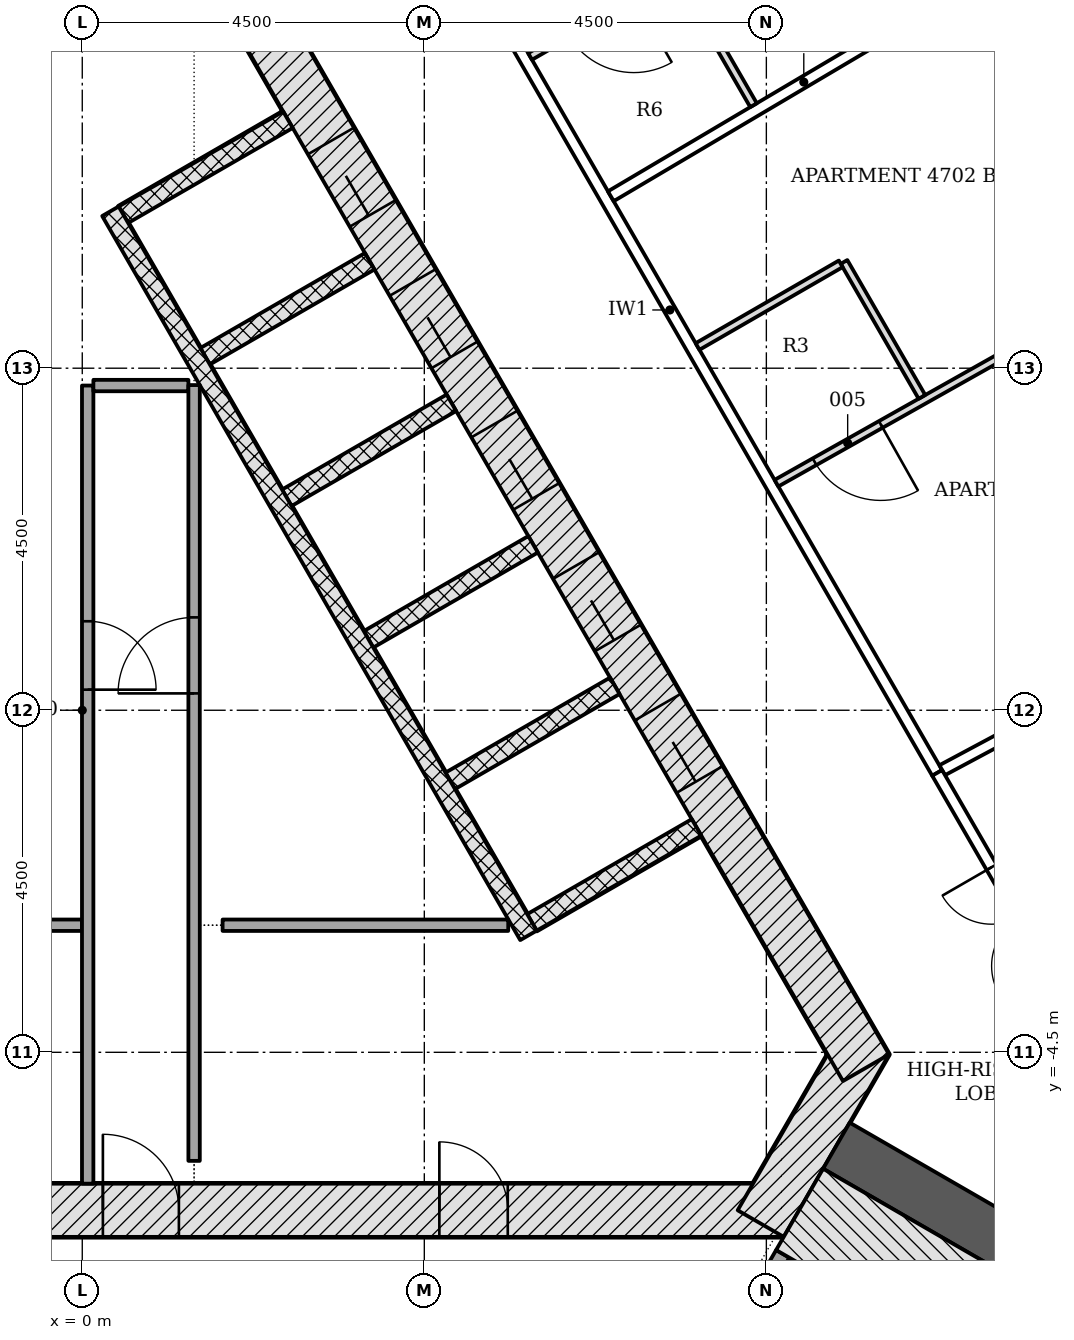
"""IFC4 building model, lengths in metres.
Left out: names, types, materials, properties, quantities, classifications, styles, units other than length and angle.
Written with IfcOpenShell. Run it as: python <this file> out.ifc"""

import sys

from ifc_helpers import new_model, si_unit, direction, frame, frame_2d, origin, place, context, subcontext, project, spatial, polyline, rectangle, outline, extrude, element, fill, save


model = new_model("IFC4")
c1 = context("Model", 3, precision=1e-05, world=origin(), true_north=direction((0.0, 1.0)))
c2 = subcontext(c1, "Body", "Model", "MODEL_VIEW")
j1 = project(units=[si_unit("LENGTHUNIT", "METRE"), si_unit("PLANEANGLEUNIT", "RADIAN")], contexts=[c1])
p1 = place(None, origin())
s1 = spatial("IfcSite", under=j1, at=p1, CompositionType="ELEMENT")
p2 = place(p1, origin())
s2 = spatial("IfcBuilding", under=s1, at=p2, CompositionType="ELEMENT")
p3 = place(p2, frame((0.0, 0.0, 185.1)))
s3 = spatial("IfcBuildingStorey", under=s2, at=p3, CompositionType="ELEMENT", Elevation=185.1)
p4 = place(p3, frame((-9.229, -6.578, -0.2), z_axis=(0.0, 0.0, 1.0), x_axis=(1.0, 0.0, 0.0)))
e1 = element("IfcWall", 1, at=p4, inside=s3, PredefinedType="SHEAR", context=c2, shape_type="SweptSolid", body=[
    extrude(rectangle(XDim=18.458, YDim=0.7, at=frame_2d((9.229, 0.0))), origin(), (0.0, 0.0, 1.0), 3.6),
])
p5 = place(p4, frame((9.5, 0.0, 0.2)))
e2 = element("IfcOpeningElement", 2, at=p5, cuts=e1, PredefinedType="OPENING", context=c2, shape_type="SweptSolid", body=[
    extrude(rectangle(XDim=1.0, YDim=2.1, at=frame_2d((0.5, 1.05))), frame((0.0, 0.36, 0.0), z_axis=(0.0, -1.0, 0.0), x_axis=(1.0, 0.0, 0.0)), (0.0, 0.0, 1.0), 0.72),
])
p6 = place(p4, frame((4.402, 0.0, 0.2)))
e3 = element("IfcOpeningElement", 3, at=p6, cuts=e1, PredefinedType="OPENING", context=c2, shape_type="SweptSolid", body=[
    extrude(rectangle(XDim=0.9, YDim=2.1, at=frame_2d((0.45, 1.05))), frame((0.0, 0.36, 0.0), z_axis=(0.0, -1.0, 0.0), x_axis=(1.0, 0.0, 0.0)), (0.0, 0.0, 1.0), 0.72),
])
p7 = place(p4, frame((13.927, 0.0, 0.2)))
e4 = element("IfcOpeningElement", 4, at=p7, cuts=e1, PredefinedType="OPENING", context=c2, shape_type="SweptSolid", body=[
    extrude(rectangle(XDim=0.9, YDim=2.1, at=frame_2d((0.45, 1.05))), frame((0.0, 0.36, 0.0), z_axis=(0.0, -1.0, 0.0), x_axis=(1.0, 0.0, 0.0)), (0.0, 0.0, 1.0), 0.72),
])
p8 = place(p3, frame((8.926, -6.753, -0.2), z_axis=(0.0, 0.0, 1.0), x_axis=(0.500042739161, 0.866000726912, 0.0)))
e5 = element("IfcWall", 5, at=p8, inside=s3, PredefinedType="SHEAR", context=c2, shape_type="SweptSolid", body=[
    extrude(rectangle(XDim=2.771, YDim=0.7, at=frame_2d((1.386, 0.0))), origin(), (0.0, 0.0, 1.0), 3.6),
])
p9 = place(p3, frame((10.311, -4.703, -0.2), z_axis=(0.0, 0.0, 1.0), x_axis=(-0.500001446645, 0.866024568562, 0.0)))
e6 = element("IfcWall", 6, at=p9, inside=s3, PredefinedType="SHEAR", context=c2, shape_type="SweptSolid", body=[
    extrude(rectangle(XDim=18.458, YDim=0.7, at=frame_2d((9.229, 0.0))), origin(), (0.0, 0.0, 1.0), 3.6),
])
p10 = place(p9, frame((4.379, 0.0, 0.2)))
e7 = element("IfcOpeningElement", 7, at=p10, cuts=e6, PredefinedType="OPENING", context=c2, shape_type="SweptSolid", body=[
    extrude(rectangle(XDim=1.1, YDim=2.1, at=frame_2d((0.55, 1.05))), frame((0.0, 0.36, 0.0), z_axis=(0.0, -1.0, 0.0), x_axis=(1.0, 0.0, 0.0)), (0.0, 0.0, 1.0), 0.72),
])
p11 = place(p9, frame((6.529, 0.0, 0.2)))
e8 = element("IfcOpeningElement", 8, at=p11, cuts=e6, PredefinedType="OPENING", context=c2, shape_type="SweptSolid", body=[
    extrude(rectangle(XDim=1.1, YDim=2.1, at=frame_2d((0.55, 1.05))), frame((0.0, 0.36, 0.0), z_axis=(0.0, -1.0, 0.0), x_axis=(1.0, 0.0, 0.0)), (0.0, 0.0, 1.0), 0.72),
])
p12 = place(p9, frame((8.679, 0.0, 0.2)))
e9 = element("IfcOpeningElement", 9, at=p12, cuts=e6, PredefinedType="OPENING", context=c2, shape_type="SweptSolid", body=[
    extrude(rectangle(XDim=1.1, YDim=2.1, at=frame_2d((0.55, 1.05))), frame((0.0, 0.36, 0.0), z_axis=(0.0, -1.0, 0.0), x_axis=(1.0, 0.0, 0.0)), (0.0, 0.0, 1.0), 0.72),
])
p13 = place(p9, frame((10.829, 0.0, 0.2)))
e10 = element("IfcOpeningElement", 10, at=p13, cuts=e6, PredefinedType="OPENING", context=c2, shape_type="SweptSolid", body=[
    extrude(rectangle(XDim=1.1, YDim=2.1, at=frame_2d((0.55, 1.05))), frame((0.0, 0.36, 0.0), z_axis=(0.0, -1.0, 0.0), x_axis=(1.0, 0.0, 0.0)), (0.0, 0.0, 1.0), 0.72),
])
p14 = place(p9, frame((12.979, 0.0, 0.2)))
e11 = element("IfcOpeningElement", 11, at=p14, cuts=e6, PredefinedType="OPENING", context=c2, shape_type="SweptSolid", body=[
    extrude(rectangle(XDim=1.1, YDim=2.1, at=frame_2d((0.55, 1.05))), frame((0.0, 0.36, 0.0), z_axis=(0.0, -1.0, 0.0), x_axis=(1.0, 0.0, 0.0)), (0.0, 0.0, 1.0), 0.72),
])
p15 = place(p3, frame((9.922, -5.728, -0.2), z_axis=(0.0, 0.0, 1.0), x_axis=(0.866025463095, -0.499999897272, 0.0)))
e12 = element("IfcWall", 12, at=p15, inside=s3, PredefinedType="SHEAR", context=c2, shape_type="SweptSolid", body=[
    extrude(rectangle(XDim=9.521, YDim=0.7, at=frame_2d((4.761, 0.0))), origin(), (0.0, 0.0, 1.0), 3.6),
])
p16 = place(p3, origin())
e13 = element("IfcWall", 13, at=p16, inside=s3, PredefinedType="PARAPET", context=c2, shape_type="SweptSolid", body=[
    extrude(outline(polyline([(22.265, -7.662), (24.846, -6.048), (27.171, -4.156), (29.169, -2.042), (30.78, 0.228), (31.954, 2.586), (32.656, 4.96), (32.864, 7.277), (32.572, 9.469), (31.789, 11.467), (30.539, 13.211), (28.86, 14.648), (26.802, 15.735), (24.429, 16.438), (21.812, 16.737), (19.031, 16.622), (16.171, 16.096), (13.317, 15.176), (10.558, 13.889), (10.664, 13.662), (13.409, 14.942), (16.232, 15.853), (19.059, 16.373), (21.803, 16.487), (24.379, 16.193), (26.708, 15.502), (28.719, 14.44), (30.354, 13.041), (31.568, 11.346), (32.328, 9.406), (32.612, 7.272), (32.409, 5.007), (31.72, 2.678), (30.565, 0.357), (28.976, -1.883), (27.001, -3.972), (24.7, -5.844), (22.132, -7.45), (22.265, -7.662)])), origin(), (0.0, 0.0, 1.0), 1.1),
])
for number, where, z_axis, x_axis in (
    (14, (8.081, -1.541, -0.2), (0.0, 0.0, 1.0), (-0.866, -0.5, 0.0)),
    (15, (7.006, 0.321, -0.2), (0.0, 0.0, 1.0), (-0.866, -0.5, 0.0)),
):
    element("IfcWall", number, at=place(p3, frame(where, z_axis=z_axis, x_axis=x_axis)), inside=s3, PredefinedType="PARTITIONING", context=c2, shape_type="SweptSolid", body=[
        extrude(rectangle(XDim=2.5, YDim=0.25, at=frame_2d((1.25, 0.0))), origin(), (0.0, 0.0, 1.0), 3.6),
    ])
p17 = place(p3, frame((5.931, 2.183, -0.2), z_axis=(0.0, 0.0, 1.0), x_axis=(-0.866047370643, -0.499961950354, 0.0)))
e16 = element("IfcWall", 16, at=p17, inside=s3, PredefinedType="PARTITIONING", context=c2, shape_type="SweptSolid", body=[
    extrude(rectangle(XDim=2.5, YDim=0.25, at=frame_2d((1.25, 0.0))), origin(), (0.0, 0.0, 1.0), 3.6),
])
for number, where, z_axis, x_axis in (
    (17, (4.856, 4.045, -0.2), (0.0, 0.0, 1.0), (-0.866, -0.5, 0.0)),
    (18, (3.781, 5.907, -0.2), (0.0, 0.0, 1.0), (-0.866, -0.5, 0.0)),
    (19, (2.706, 7.769, -0.2), (0.0, 0.0, 1.0), (-0.866, -0.5, 0.0)),
):
    element("IfcWall", number, at=place(p3, frame(where, z_axis=z_axis, x_axis=x_axis)), inside=s3, PredefinedType="PARTITIONING", context=c2, shape_type="SweptSolid", body=[
        extrude(rectangle(XDim=2.5, YDim=0.25, at=frame_2d((1.25, 0.0))), origin(), (0.0, 0.0, 1.0), 3.6),
    ])
p18 = place(p3, frame((5.87, -2.961, 0.0), z_axis=(0.0, 0.0, 1.0), x_axis=(-0.50000615651, 0.866021849293, 0.0)))
e20 = element("IfcWall", 20, at=p18, inside=s3, PredefinedType="PARTITIONING", context=c2, shape_type="SweptSolid", body=[
    extrude(rectangle(XDim=11.0, YDim=0.25, at=frame_2d((5.5, 0.0))), origin(), (0.0, 0.0, 1.0), 3.4),
])
p19 = place(p3, frame((-5.142, -2.828, 0.0), z_axis=(0.0, 0.0, 1.0), x_axis=(1.0, 0.0, 0.0)))
e21 = element("IfcWall", 21, at=p19, inside=s3, PredefinedType="PARTITIONING", context=c2, shape_type="SweptSolid", body=[
    extrude(rectangle(XDim=5.139, YDim=0.15, at=frame_2d((2.569, 0.0))), origin(), (0.0, 0.0, 1.0), 3.4),
])
p20 = place(p3, frame((0.071, 4.272, 0.0), z_axis=(0.0, 0.0, 1.0), x_axis=(0.0, -1.0, 0.0)))
e22 = element("IfcWall", 22, at=p20, inside=s3, PredefinedType="PARTITIONING", context=c2, shape_type="SweptSolid", body=[
    extrude(rectangle(XDim=10.5, YDim=0.15, at=frame_2d((5.25, 0.0))), origin(), (0.0, 0.0, 1.0), 3.4),
])
p21 = place(p20, frame((3.101, 0.0, 0.0)))
e23 = element("IfcOpeningElement", 23, at=p21, cuts=e22, PredefinedType="OPENING", context=c2, shape_type="SweptSolid", body=[
    extrude(rectangle(XDim=0.9, YDim=2.1, at=frame_2d((0.45, 1.05))), frame((0.0, 0.085, 0.0), z_axis=(0.0, -1.0, 0.0), x_axis=(1.0, 0.0, 0.0)), (0.0, 0.0, 1.0), 0.17),
])
p22 = place(p3, frame((0.146, 4.272, 0.0), z_axis=(0.0, 0.0, 1.0), x_axis=(1.0, 0.0, 0.0)))
e24 = element("IfcWall", 24, at=p22, inside=s3, PredefinedType="PARTITIONING", context=c2, shape_type="SweptSolid", body=[
    extrude(rectangle(XDim=1.25, YDim=0.15, at=frame_2d((0.625, 0.0))), origin(), (0.0, 0.0, 1.0), 3.4),
])
p23 = place(p3, frame((1.471, -5.928, 0.0), z_axis=(0.0, 0.0, 1.0), x_axis=(0.0, 1.0, 0.0)))
e25 = element("IfcWall", 25, at=p23, inside=s3, PredefinedType="PARTITIONING", context=c2, shape_type="SweptSolid", body=[
    extrude(rectangle(XDim=10.206, YDim=0.15, at=frame_2d((5.103, 0.0))), origin(), (0.0, 0.0, 1.0), 3.4),
])
p24 = place(p23, frame((6.15, 0.0, 0.0)))
e26 = element("IfcOpeningElement", 26, at=p24, cuts=e25, PredefinedType="OPENING", context=c2, shape_type="SweptSolid", body=[
    extrude(rectangle(XDim=1.0, YDim=2.1, at=frame_2d((0.5, 1.05))), frame((0.0, 0.085, 0.0), z_axis=(0.0, -1.0, 0.0), x_axis=(1.0, 0.0, 0.0)), (0.0, 0.0, 1.0), 0.17),
])
p25 = place(p3, frame((1.846, -2.828, 0.0), z_axis=(0.0, 0.0, 1.0), x_axis=(1.0, 0.0, 0.0)))
e27 = element("IfcWall", 27, at=p25, inside=s3, PredefinedType="PARTITIONING", context=c2, shape_type="SweptSolid", body=[
    extrude(rectangle(XDim=3.758, YDim=0.15, at=frame_2d((1.879, 0.0))), origin(), (0.0, 0.0, 1.0), 3.4),
])
p26 = place(p3, frame((7.44, -10.226, -0.2), z_axis=(0.0, 0.0, 1.0), x_axis=(0.500022077904, 0.866012656725, 0.0)))
e28 = element("IfcWall", 28, at=p26, inside=s3, PredefinedType="SHEAR", context=c2, shape_type="SweptSolid", body=[
    extrude(rectangle(XDim=3.55, YDim=0.2, at=frame_2d((1.775, 0.0))), origin(), (0.0, 0.0, 1.0), 3.6),
])
p27 = place(p26, frame((1.175, 0.0, 0.2)))
e29 = element("IfcOpeningElement", 29, at=p27, cuts=e28, PredefinedType="OPENING", context=c2, shape_type="SweptSolid", body=[
    extrude(rectangle(XDim=1.2, YDim=2.1, at=frame_2d((0.6, 1.05))), frame((0.0, 0.11, 0.0), z_axis=(0.0, -1.0, 0.0), x_axis=(1.0, 0.0, 0.0)), (0.0, 0.0, 1.0), 0.22),
])
p28 = place(p3, frame((9.438, -6.566, -0.2), z_axis=(0.0, 0.0, 1.0), x_axis=(0.866026919366, -0.499997374926, 0.0)))
e30 = element("IfcWall", 30, at=p28, inside=s3, PredefinedType="SHEAR", context=c2, shape_type="SweptSolid", body=[
    extrude(rectangle(XDim=7.2, YDim=1.236, at=frame_2d((3.6, 0.0))), origin(), (0.0, 0.0, 1.0), 3.6),
])
p29 = place(p3, frame((11.247, -0.824, 0.0), z_axis=(0.0, 0.0, 1.0), x_axis=(-0.499997921847, 0.866026603603, 0.0)))
e31 = element("IfcWall", 31, at=p29, inside=s3, PredefinedType="PARTITIONING", context=c2, shape_type="SweptSolid", body=[
    extrude(rectangle(XDim=14.065, YDim=0.15, at=frame_2d((7.032, 0.0))), origin(), (0.0, 0.0, 1.0), 2.847),
])
p30 = place(p29, frame((11.953, 0.0, 0.0)))
e32 = element("IfcOpeningElement", 32, at=p30, cuts=e31, PredefinedType="OPENING", context=c2, shape_type="SweptSolid", body=[
    extrude(rectangle(XDim=1.0, YDim=2.1, at=frame_2d((0.5, 1.05))), frame((0.0, 0.085, 0.0), z_axis=(0.0, -1.0, 0.0), x_axis=(1.0, 0.0, 0.0)), (0.0, 0.0, 1.0), 0.17),
])
p31 = place(p3, frame((16.44, 1.956, 0.0), z_axis=(0.0, 0.0, 1.0), x_axis=(-0.881627849584, -0.471945266783, 0.0)))
e33 = element("IfcWall", 33, at=p31, inside=s3, PredefinedType="PARTITIONING", context=c2, shape_type="SweptSolid", body=[
    extrude(rectangle(XDim=5.815, YDim=0.15, at=frame_2d((2.907, 0.0))), origin(), (0.0, 0.0, 1.0), 3.4),
])
p32 = place(p31, frame((2.445, 0.0, 0.0)))
e34 = element("IfcOpeningElement", 34, at=p32, cuts=e33, PredefinedType="OPENING", context=c2, shape_type="SweptSolid", body=[
    extrude(rectangle(XDim=1.0, YDim=2.1, at=frame_2d((0.5, 1.05))), frame((0.0, 0.085, 0.0), z_axis=(0.0, -1.0, 0.0), x_axis=(1.0, 0.0, 0.0)), (0.0, 0.0, 1.0), 0.17),
])
p33 = place(p3, frame((13.429, -4.604, 0.0), z_axis=(0.0, 0.0, 1.0), x_axis=(-0.499995208485, 0.866028170149, 0.0)))
e35 = element("IfcWall", 35, at=p33, inside=s3, PredefinedType="PARTITIONING", context=c2, shape_type="SweptSolid", body=[
    extrude(rectangle(XDim=4.365, YDim=0.15, at=frame_2d((2.182, 0.0))), origin(), (0.0, 0.0, 1.0), 2.852),
])
p34 = place(p33, frame((1.432, 0.0, 0.0)))
e36 = element("IfcOpeningElement", 36, at=p34, cuts=e35, PredefinedType="OPENING", context=c2, shape_type="SweptSolid", body=[
    extrude(rectangle(XDim=1.5, YDim=2.1, at=frame_2d((0.75, 1.05))), frame((0.0, 0.085, 0.0), z_axis=(0.0, -1.0, 0.0), x_axis=(1.0, 0.0, 0.0)), (0.0, 0.0, 1.0), 0.17),
])
p35 = place(p3, frame((14.277, 5.885, 0.0), z_axis=(0.0, 0.0, 1.0), x_axis=(-0.871335785584, -0.490687220907, 0.0)))
e37 = element("IfcWall", 37, at=p35, inside=s3, PredefinedType="PARTITIONING", context=c2, shape_type="SweptSolid", body=[
    extrude(rectangle(XDim=5.904, YDim=0.1, at=frame_2d((2.952, 0.0))), origin(), (0.0, 0.0, 1.0), 3.4),
])
p36 = place(p35, frame((1.339, 0.0, 0.0)))
e38 = element("IfcOpeningElement", 38, at=p36, cuts=e37, PredefinedType="OPENING", context=c2, shape_type="SweptSolid", body=[
    extrude(rectangle(XDim=1.0, YDim=2.1, at=frame_2d((0.5, 1.05))), frame((0.0, 0.06, 0.0), z_axis=(0.0, -1.0, 0.0), x_axis=(1.0, 0.0, 0.0)), (0.0, 0.0, 1.0), 0.12),
])
p37 = place(p35, frame((4.329, 0.0, 0.0)))
e39 = element("IfcOpeningElement", 39, at=p37, cuts=e37, PredefinedType="OPENING", context=c2, shape_type="SweptSolid", body=[
    extrude(rectangle(XDim=1.0, YDim=2.1, at=frame_2d((0.5, 1.05))), frame((0.0, 0.06, 0.0), z_axis=(0.0, -1.0, 0.0), x_axis=(1.0, 0.0, 0.0)), (0.0, 0.0, 1.0), 0.12),
])
p38 = place(p3, frame((11.047, 4.123, 0.0), z_axis=(0.0, 0.0, 1.0), x_axis=(-0.500007699544, 0.866020958405, 0.0)))
e40 = element("IfcWall", 40, at=p38, inside=s3, PredefinedType="PARTITIONING", context=c2, shape_type="SweptSolid", body=[
    extrude(rectangle(XDim=2.05, YDim=0.1, at=frame_2d((1.025, 0.0))), origin(), (0.0, 0.0, 1.0), 3.4),
])
p39 = place(p3, frame((9.979, 5.873, 0.0), z_axis=(0.0, 0.0, 1.0), x_axis=(-0.866037911478, -0.499978335414, 0.0)))
e41 = element("IfcWall", 41, at=p39, inside=s3, PredefinedType="PARTITIONING", context=c2, shape_type="SweptSolid", body=[
    extrude(rectangle(XDim=2.175, YDim=0.1, at=frame_2d((1.087, 0.0))), origin(), (0.0, 0.0, 1.0), 3.4),
])
p40 = place(p3, frame((12.031, 9.766, 0.0), z_axis=(0.0, 0.0, 1.0), x_axis=(-0.860638865546, -0.509215811922, 0.0)))
e42 = element("IfcWall", 42, at=p40, inside=s3, PredefinedType="PARTITIONING", context=c2, shape_type="SweptSolid", body=[
    extrude(rectangle(XDim=5.9, YDim=0.15, at=frame_2d((2.95, 0.0))), origin(), (0.0, 0.0, 1.0), 3.4),
])
p41 = place(p3, frame((8.831, 7.96, 0.0), z_axis=(0.0, 0.0, 1.0), x_axis=(-0.499990325971, 0.866030989016, 0.0)))
e43 = element("IfcWall", 43, at=p41, inside=s3, PredefinedType="PARTITIONING", context=c2, shape_type="SweptSolid", body=[
    extrude(rectangle(XDim=2.025, YDim=0.1, at=frame_2d((1.012, 0.0))), origin(), (0.0, 0.0, 1.0), 3.4),
])
p42 = place(p3, frame((7.775, 9.689, 0.0), z_axis=(0.0, 0.0, 1.0), x_axis=(-0.865989304205, -0.500062521093, 0.0)))
e44 = element("IfcWall", 44, at=p42, inside=s3, PredefinedType="PARTITIONING", context=c2, shape_type="SweptSolid", body=[
    extrude(rectangle(XDim=2.175, YDim=0.1, at=frame_2d((1.087, 0.0))), origin(), (0.0, 0.0, 1.0), 3.4),
])
p43 = place(p42, frame((0.6, 0.0, 0.0)))
e45 = element("IfcOpeningElement", 45, at=p43, cuts=e44, PredefinedType="OPENING", context=c2, shape_type="SweptSolid", body=[
    extrude(rectangle(XDim=1.0, YDim=2.1, at=frame_2d((0.5, 1.05))), frame((0.0, 0.06, 0.0), z_axis=(0.0, -1.0, 0.0), x_axis=(1.0, 0.0, 0.0)), (0.0, 0.0, 1.0), 0.12),
])
p44 = place(p3, frame((-0.35, 18.85, 0.0), z_axis=(0.0, 0.0, 1.0), x_axis=(-0.500005388685, -0.866022292603, 0.0)))
e46 = element("IfcWall", 46, at=p44, inside=s3, PredefinedType="PARTITIONING", context=c2, shape_type="SweptSolid", body=[
    extrude(rectangle(XDim=14.167, YDim=0.15, at=frame_2d((7.083, 0.0))), origin(), (0.0, 0.0, 1.0), 2.847),
])
p45 = place(p10, origin())
e47 = element("IfcDoor", 47, at=p45, inside=s3, OperationType="DOUBLE_DOOR_SLIDING", PredefinedType="DOOR", context=c2, shape_type="SweptSolid", body=[
    extrude(rectangle(XDim=1.1, YDim=2.1, at=frame_2d((0.55, 1.05))), frame((0.0, 0.025, 0.0), z_axis=(0.0, -1.0, 0.0), x_axis=(1.0, 0.0, 0.0)), (0.0, 0.0, 1.0), 0.05),
])
fill(e7, e47)
p46 = place(p11, origin())
e48 = element("IfcDoor", 48, at=p46, inside=s3, OperationType="DOUBLE_DOOR_SLIDING", PredefinedType="DOOR", context=c2, shape_type="SweptSolid", body=[
    extrude(rectangle(XDim=1.1, YDim=2.1, at=frame_2d((0.55, 1.05))), frame((0.0, 0.025, 0.0), z_axis=(0.0, -1.0, 0.0), x_axis=(1.0, 0.0, 0.0)), (0.0, 0.0, 1.0), 0.05),
])
fill(e8, e48)
p47 = place(p12, origin())
e49 = element("IfcDoor", 49, at=p47, inside=s3, OperationType="DOUBLE_DOOR_SLIDING", PredefinedType="DOOR", context=c2, shape_type="SweptSolid", body=[
    extrude(rectangle(XDim=1.1, YDim=2.1, at=frame_2d((0.55, 1.05))), frame((0.0, 0.025, 0.0), z_axis=(0.0, -1.0, 0.0), x_axis=(1.0, 0.0, 0.0)), (0.0, 0.0, 1.0), 0.05),
])
fill(e9, e49)
p48 = place(p13, origin())
e50 = element("IfcDoor", 50, at=p48, inside=s3, OperationType="DOUBLE_DOOR_SLIDING", PredefinedType="DOOR", context=c2, shape_type="SweptSolid", body=[
    extrude(rectangle(XDim=1.1, YDim=2.1, at=frame_2d((0.55, 1.05))), frame((0.0, 0.025, 0.0), z_axis=(0.0, -1.0, 0.0), x_axis=(1.0, 0.0, 0.0)), (0.0, 0.0, 1.0), 0.05),
])
fill(e10, e50)
p49 = place(p14, origin())
e51 = element("IfcDoor", 51, at=p49, inside=s3, OperationType="DOUBLE_DOOR_SLIDING", PredefinedType="DOOR", context=c2, shape_type="SweptSolid", body=[
    extrude(rectangle(XDim=1.1, YDim=2.1, at=frame_2d((0.55, 1.05))), frame((0.0, 0.025, 0.0), z_axis=(0.0, -1.0, 0.0), x_axis=(1.0, 0.0, 0.0)), (0.0, 0.0, 1.0), 0.05),
])
fill(e11, e51)
p50 = place(p5, origin())
e52 = element("IfcDoor", 52, at=p50, inside=s3, OperationType="SINGLE_SWING_LEFT", PredefinedType="DOOR", context=c2, shape_type="SweptSolid", body=[
    extrude(rectangle(XDim=1.0, YDim=2.1, at=frame_2d((0.5, 1.05))), frame((0.0, 0.075, 0.0), z_axis=(0.0, -1.0, 0.0), x_axis=(1.0, 0.0, 0.0)), (0.0, 0.0, 1.0), 0.15),
])
fill(e2, e52)
p51 = place(p7, origin())
e53 = element("IfcDoor", 53, at=p51, inside=s3, OperationType="SINGLE_SWING_LEFT", PredefinedType="DOOR", context=c2, shape_type="SweptSolid", body=[
    extrude(rectangle(XDim=0.9, YDim=2.1, at=frame_2d((0.45, 1.05))), frame((0.0, 0.075, 0.0), z_axis=(0.0, -1.0, 0.0), x_axis=(1.0, 0.0, 0.0)), (0.0, 0.0, 1.0), 0.15),
])
fill(e4, e53)
p52 = place(p21, origin())
e54 = element("IfcDoor", 54, at=p52, inside=s3, OperationType="SINGLE_SWING_RIGHT", PredefinedType="DOOR", context=c2, shape_type="SweptSolid", body=[
    extrude(rectangle(XDim=0.9, YDim=2.1, at=frame_2d((0.45, 1.05))), frame((0.0, 0.025, 0.0), z_axis=(0.0, -1.0, 0.0), x_axis=(1.0, 0.0, 0.0)), (0.0, 0.0, 1.0), 0.05),
])
fill(e23, e54)
p53 = place(p24, origin())
e55 = element("IfcDoor", 55, at=p53, inside=s3, OperationType="SINGLE_SWING_LEFT", PredefinedType="DOOR", context=c2, shape_type="SweptSolid", body=[
    extrude(rectangle(XDim=1.0, YDim=2.1, at=frame_2d((0.5, 1.05))), frame((0.0, 0.025, 0.0), z_axis=(0.0, -1.0, 0.0), x_axis=(1.0, 0.0, 0.0)), (0.0, 0.0, 1.0), 0.05),
])
fill(e26, e55)
p54 = place(p34, origin())
e56 = element("IfcDoor", 56, at=p54, inside=s3, OperationType="DOUBLE_DOOR_SINGLE_SWING", PredefinedType="DOOR", context=c2, shape_type="SweptSolid", body=[
    extrude(rectangle(XDim=1.5, YDim=2.1, at=frame_2d((0.75, 1.05))), frame((0.0, 0.025, 0.0), z_axis=(0.0, -1.0, 0.0), x_axis=(1.0, 0.0, 0.0)), (0.0, 0.0, 1.0), 0.05),
])
fill(e36, e56)
p55 = place(p37, origin())
e57 = element("IfcDoor", 57, at=p55, inside=s3, OperationType="SINGLE_SWING_LEFT", PredefinedType="DOOR", context=c2, shape_type="SweptSolid", body=[
    extrude(rectangle(XDim=1.0, YDim=2.1, at=frame_2d((0.5, 1.05))), frame((0.0, 0.025, 0.0), z_axis=(0.0, -1.0, 0.0), x_axis=(1.0, 0.0, 0.0)), (0.0, 0.0, 1.0), 0.05),
])
fill(e39, e57)
save(model, sys.argv[1])
